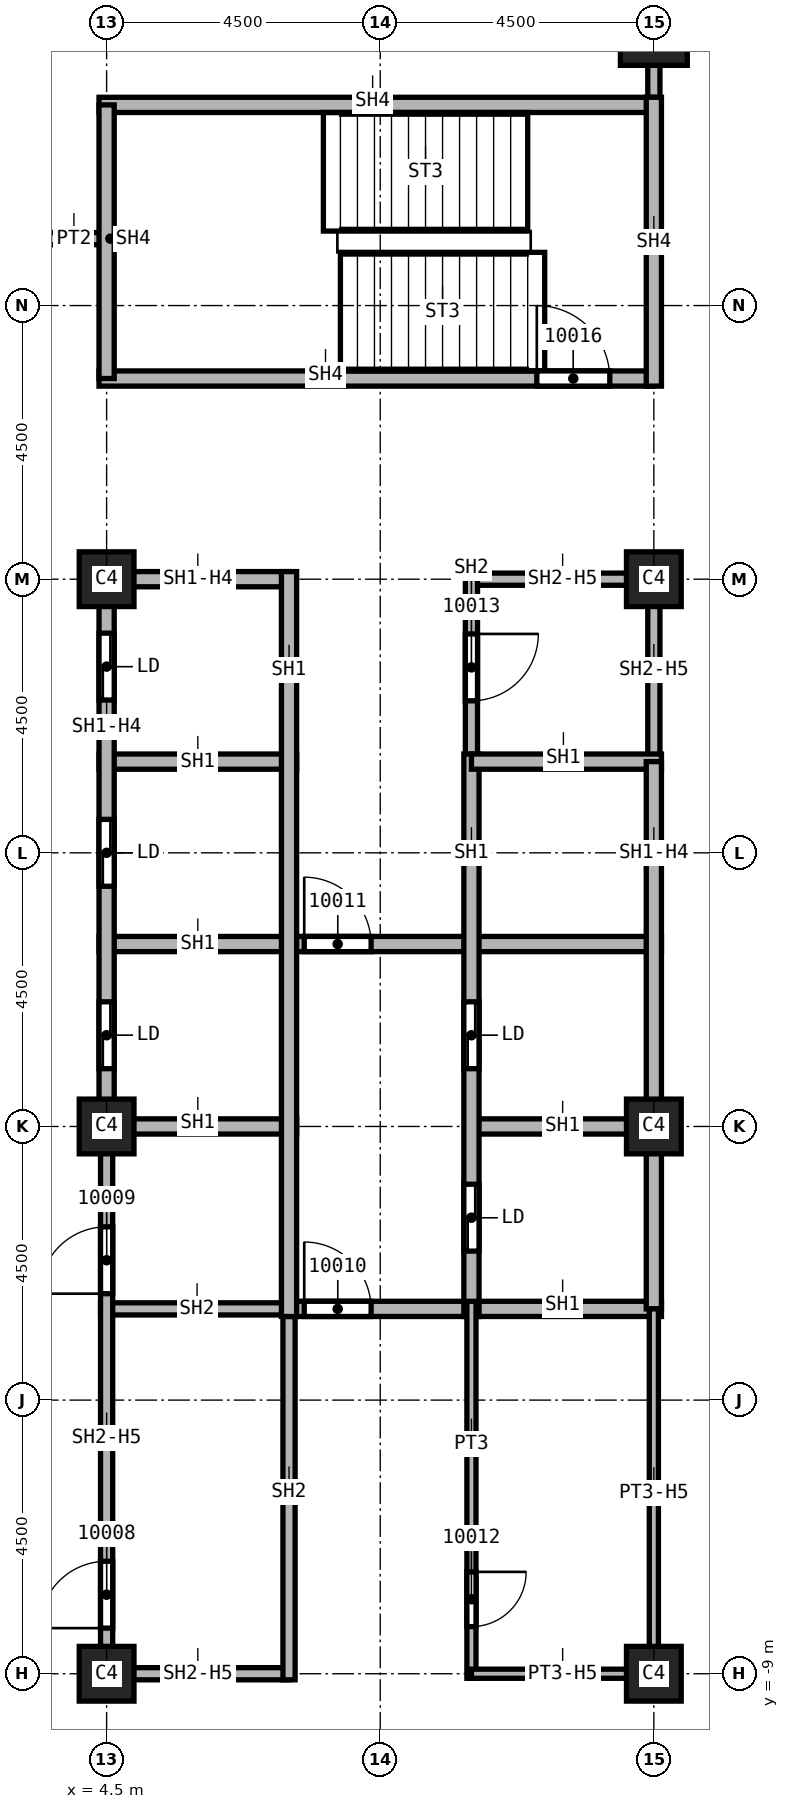
"""IFC4 building model, lengths in metres.
Left out: names, types, materials, properties, quantities, classifications, styles, units other than length and angle.
Written with IfcOpenShell. Run it as: python <this file> out.ifc"""

import sys

from ifc_helpers import new_model, si_unit, direction, frame, frame_2d, origin, origin_2d, place, context, subcontext, project, spatial, rectangle, extrude, element, fill, save


model = new_model("IFC4")
c1 = context("Model", 3, precision=1e-05, world=origin(), true_north=direction((0.0, 1.0)))
c2 = subcontext(c1, "Body", "Model", "MODEL_VIEW")
j1 = project(units=[si_unit("LENGTHUNIT", "METRE"), si_unit("PLANEANGLEUNIT", "RADIAN")], contexts=[c1])
p1 = place(None, origin())
s1 = spatial("IfcSite", under=j1, at=p1, CompositionType="ELEMENT")
p2 = place(p1, origin())
s2 = spatial("IfcBuilding", under=s1, at=p2, CompositionType="ELEMENT")
p3 = place(p2, frame((0.0, 0.0, 174.0)))
s3 = spatial("IfcBuildingStorey", under=s2, at=p3, CompositionType="ELEMENT", Elevation=174.0)
p4 = place(p3, frame((13.5, 18.0, 0.0), z_axis=(0.0, 0.0, 1.0), x_axis=(1.0, 0.0, 0.0)))
e1 = element("IfcColumn", 1, at=p4, inside=s3, PredefinedType="COLUMN", context=c2, shape_type="SweptSolid", body=[
    extrude(rectangle(XDim=1.1, YDim=1.1, at=origin_2d()), origin(), (0.0, 0.0, 1.0), 3.59),
])
for number, where, z_axis, x_axis in (
    (2, (4.5, 0.0, 0.0), (0.0, 0.0, 1.0), (1.0, 0.0, 0.0)),
    (3, (4.5, 9.0, 0.0), (0.0, 0.0, 1.0), (1.0, 0.0, 0.0)),
    (4, (4.5, -9.0, 0.0), (0.0, 0.0, 1.0), (1.0, 0.0, 0.0)),
    (5, (13.5, 0.0, 0.0), (0.0, 0.0, 1.0), (1.0, 0.0, 0.0)),
    (6, (13.5, 9.0, 0.0), (0.0, 0.0, 1.0), (1.0, 0.0, 0.0)),
    (7, (13.5, -9.0, 0.0), (0.0, 0.0, 1.0), (1.0, 0.0, 0.0)),
):
    element("IfcColumn", number, at=place(p3, frame(where, z_axis=z_axis, x_axis=x_axis)), inside=s3, PredefinedType="COLUMN", context=c2, shape_type="SweptSolid", body=[
        extrude(rectangle(XDim=0.9, YDim=0.9, at=origin_2d()), origin(), (0.0, 0.0, 1.0), 3.59),
    ])
p5 = place(p3, frame((3.55, 14.6, 0.0), z_axis=(0.0, 0.0, 1.0), x_axis=(1.0, 0.0, 0.0)))
e8 = element("IfcWall", 8, at=p5, inside=s3, PredefinedType="PARTITIONING", context=c2, shape_type="SweptSolid", body=[
    extrude(rectangle(XDim=0.95, YDim=0.2, at=frame_2d((0.475, 0.0))), origin(), (0.0, 0.0, 1.0), 3.59),
])
p6 = place(p3, frame((13.5, 16.675, 0.0), z_axis=(0.0, 0.0, 1.0), x_axis=(0.0, 1.0, 0.0)))
e9 = element("IfcWall", 9, at=p6, inside=s3, PredefinedType="PARTITIONING", context=c2, shape_type="SweptSolid", body=[
    extrude(rectangle(XDim=6.375, YDim=0.2, at=frame_2d((3.188, 0.0))), origin(), (0.0, 0.0, 1.0), 3.59),
])
p7 = place(p6, frame((3.55, 0.0, 0.0)))
e10 = element("IfcOpeningElement", 10, at=p7, cuts=e9, PredefinedType="OPENING", context=c2, shape_type="SweptSolid", body=[
    extrude(rectangle(XDim=1.0, YDim=2.1, at=frame_2d((0.5, 1.05))), frame((0.0, 0.1, 0.0), z_axis=(0.0, -1.0, 0.0), x_axis=(1.0, 0.0, 0.0)), (0.0, 0.0, 1.0), 0.2),
])
p8 = place(p3, frame((4.4, -3.0, 0.0), z_axis=(0.0, 0.0, 1.0), x_axis=(1.0, 0.0, 0.0)))
e11 = element("IfcWall", 11, at=p8, inside=s3, PredefinedType="SOLIDWALL", context=c2, shape_type="SweptSolid", body=[
    extrude(rectangle(XDim=3.225, YDim=0.2, at=frame_2d((1.613, 0.0))), origin(), (0.0, 0.0, 1.0), 3.59),
])
p9 = place(p3, frame((4.5, -9.1, 0.0), z_axis=(0.0, 0.0, 1.0), x_axis=(0.0, 1.0, 0.0)))
e12 = element("IfcWall", 12, at=p9, inside=s3, PredefinedType="SOLIDWALL", context=c2, shape_type="SweptSolid", body=[
    extrude(rectangle(XDim=9.1, YDim=0.2, at=frame_2d((4.55, 0.0))), origin(), (0.0, 0.0, 1.0), 2.828),
])
p10 = place(p9, frame((0.85, 0.0, 0.0)))
e13 = element("IfcOpeningElement", 13, at=p10, cuts=e12, PredefinedType="OPENING", context=c2, shape_type="SweptSolid", body=[
    extrude(rectangle(XDim=1.1, YDim=2.1, at=frame_2d((0.55, 1.05))), frame((0.0, 0.1, 0.0), z_axis=(0.0, -1.0, 0.0), x_axis=(1.0, 0.0, 0.0)), (0.0, 0.0, 1.0), 0.2),
])
p11 = place(p9, frame((6.35, 0.0, 0.0)))
e14 = element("IfcOpeningElement", 14, at=p11, cuts=e12, PredefinedType="OPENING", context=c2, shape_type="SweptSolid", body=[
    extrude(rectangle(XDim=1.1, YDim=2.1, at=frame_2d((0.55, 1.05))), frame((0.0, 0.1, 0.0), z_axis=(0.0, -1.0, 0.0), x_axis=(1.0, 0.0, 0.0)), (0.0, 0.0, 1.0), 0.2),
])
p12 = place(p3, frame((7.5, -9.0, 0.0), z_axis=(0.0, 0.0, 1.0), x_axis=(-1.0, 0.0, 0.0)))
e15 = element("IfcWall", 15, at=p12, inside=s3, PredefinedType="SOLIDWALL", context=c2, shape_type="SweptSolid", body=[
    extrude(rectangle(XDim=3.0, YDim=0.2, at=frame_2d((1.5, 0.0))), origin(), (0.0, 0.0, 1.0), 2.828),
])
p13 = place(p3, frame((7.5, -2.875, 0.0), z_axis=(0.0, 0.0, 1.0), x_axis=(0.0, -1.0, 0.0)))
e16 = element("IfcWall", 16, at=p13, inside=s3, PredefinedType="SOLIDWALL", context=c2, shape_type="SweptSolid", body=[
    extrude(rectangle(XDim=6.225, YDim=0.2, at=frame_2d((3.113, 0.0))), origin(), (0.0, 0.0, 1.0), 3.59),
])
p14 = place(p3, frame((10.5, 9.0, 0.0), z_axis=(0.0, 0.0, 1.0), x_axis=(1.0, 0.0, 0.0)))
e17 = element("IfcWall", 17, at=p14, inside=s3, PredefinedType="SOLIDWALL", context=c2, shape_type="SweptSolid", body=[
    extrude(rectangle(XDim=3.0, YDim=0.2, at=frame_2d((1.5, 0.0))), origin(), (0.0, 0.0, 1.0), 2.828),
])
p15 = place(p3, frame((10.5, 9.1, 0.0), z_axis=(0.0, 0.0, 1.0), x_axis=(0.0, -1.0, 0.0)))
e18 = element("IfcWall", 18, at=p15, inside=s3, PredefinedType="SOLIDWALL", context=c2, shape_type="SweptSolid", body=[
    extrude(rectangle(XDim=3.225, YDim=0.2, at=frame_2d((1.613, 0.0))), origin(), (0.0, 0.0, 1.0), 3.59),
])
p16 = place(p15, frame((1.0, 0.0, 0.0)))
e19 = element("IfcOpeningElement", 19, at=p16, cuts=e18, PredefinedType="OPENING", context=c2, shape_type="SweptSolid", body=[
    extrude(rectangle(XDim=1.1, YDim=2.1, at=frame_2d((0.55, 1.05))), frame((0.0, 0.1, 0.0), z_axis=(0.0, -1.0, 0.0), x_axis=(1.0, 0.0, 0.0)), (0.0, 0.0, 1.0), 0.2),
])
p17 = place(p3, frame((13.5, 9.1, 0.0), z_axis=(0.0, 0.0, 1.0), x_axis=(0.0, -1.0, 0.0)))
e20 = element("IfcWall", 20, at=p17, inside=s3, PredefinedType="SOLIDWALL", context=c2, shape_type="SweptSolid", body=[
    extrude(rectangle(XDim=3.1, YDim=0.2, at=frame_2d((1.55, 0.0))), origin(), (0.0, 0.0, 1.0), 2.828),
])
p18 = place(p3, frame((4.375, 0.0, 0.0), z_axis=(0.0, 0.0, 1.0), x_axis=(1.0, 0.0, 0.0)))
e21 = element("IfcWall", 21, at=p18, inside=s3, PredefinedType="SOLIDWALL", context=c2, shape_type="SweptSolid", body=[
    extrude(rectangle(XDim=3.25, YDim=0.25, at=frame_2d((1.625, 0.0))), origin(), (0.0, 0.0, 1.0), 3.59),
])
p19 = place(p3, frame((4.375, 3.0, 0.0), z_axis=(0.0, 0.0, 1.0), x_axis=(1.0, 0.0, 0.0)))
e22 = element("IfcWall", 22, at=p19, inside=s3, PredefinedType="SOLIDWALL", context=c2, shape_type="SweptSolid", body=[
    extrude(rectangle(XDim=9.25, YDim=0.25, at=frame_2d((4.625, 0.0))), origin(), (0.0, 0.0, 1.0), 3.59),
])
p20 = place(p19, frame((3.375, 0.0, 0.0)))
e23 = element("IfcOpeningElement", 23, at=p20, cuts=e22, PredefinedType="OPENING", context=c2, shape_type="SweptSolid", body=[
    extrude(rectangle(XDim=1.1, YDim=2.1, at=frame_2d((0.55, 1.05))), frame((0.0, 0.125, 0.0), z_axis=(0.0, -1.0, 0.0), x_axis=(1.0, 0.0, 0.0)), (0.0, 0.0, 1.0), 0.25),
])
p21 = place(p3, frame((4.375, 6.0, 0.0), z_axis=(0.0, 0.0, 1.0), x_axis=(1.0, 0.0, 0.0)))
e24 = element("IfcWall", 24, at=p21, inside=s3, PredefinedType="SOLIDWALL", context=c2, shape_type="SweptSolid", body=[
    extrude(rectangle(XDim=3.25, YDim=0.25, at=frame_2d((1.625, 0.0))), origin(), (0.0, 0.0, 1.0), 3.59),
])
p22 = place(p3, frame((4.5, 0.0, 0.0), z_axis=(0.0, 0.0, 1.0), x_axis=(0.0, 1.0, 0.0)))
e25 = element("IfcWall", 25, at=p22, inside=s3, PredefinedType="SOLIDWALL", context=c2, shape_type="SweptSolid", body=[
    extrude(rectangle(XDim=9.125, YDim=0.25, at=frame_2d((4.562, 0.0))), origin(), (0.0, 0.0, 1.0), 2.828),
])
p23 = place(p22, frame((0.95, 0.0, 0.0)))
e26 = element("IfcOpeningElement", 26, at=p23, cuts=e25, PredefinedType="OPENING", context=c2, shape_type="SweptSolid", body=[
    extrude(rectangle(XDim=1.1, YDim=2.1, at=frame_2d((0.55, 1.05))), frame((0.0, 0.125, 0.0), z_axis=(0.0, -1.0, 0.0), x_axis=(1.0, 0.0, 0.0)), (0.0, 0.0, 1.0), 0.25),
])
p24 = place(p22, frame((3.95, 0.0, 0.0)))
e27 = element("IfcOpeningElement", 27, at=p24, cuts=e25, PredefinedType="OPENING", context=c2, shape_type="SweptSolid", body=[
    extrude(rectangle(XDim=1.1, YDim=2.1, at=frame_2d((0.55, 1.05))), frame((0.0, 0.125, 0.0), z_axis=(0.0, -1.0, 0.0), x_axis=(1.0, 0.0, 0.0)), (0.0, 0.0, 1.0), 0.25),
])
p25 = place(p22, frame((7.012, 0.0, 0.0)))
e28 = element("IfcOpeningElement", 28, at=p25, cuts=e25, PredefinedType="OPENING", context=c2, shape_type="SweptSolid", body=[
    extrude(rectangle(XDim=1.1, YDim=2.1, at=frame_2d((0.55, 1.05))), frame((0.0, 0.125, 0.0), z_axis=(0.0, -1.0, 0.0), x_axis=(1.0, 0.0, 0.0)), (0.0, 0.0, 1.0), 0.25),
])
p26 = place(p3, frame((4.5, 9.0, 0.0), z_axis=(0.0, 0.0, 1.0), x_axis=(1.0, 0.0, 0.0)))
e29 = element("IfcWall", 29, at=p26, inside=s3, PredefinedType="SOLIDWALL", context=c2, shape_type="SweptSolid", body=[
    extrude(rectangle(XDim=3.0, YDim=0.25, at=frame_2d((1.5, 0.0))), origin(), (0.0, 0.0, 1.0), 2.828),
])
p27 = place(p3, frame((7.5, -3.0, 0.0), z_axis=(0.0, 0.0, 1.0), x_axis=(1.0, 0.0, 0.0)))
e30 = element("IfcWall", 30, at=p27, inside=s3, PredefinedType="SOLIDWALL", context=c2, shape_type="SweptSolid", body=[
    extrude(rectangle(XDim=6.125, YDim=0.25, at=frame_2d((3.062, 0.0))), origin(), (0.0, 0.0, 1.0), 3.59),
])
p28 = place(p27, frame((0.25, 0.0, 0.0)))
e31 = element("IfcOpeningElement", 31, at=p28, cuts=e30, PredefinedType="OPENING", context=c2, shape_type="SweptSolid", body=[
    extrude(rectangle(XDim=1.1, YDim=2.1, at=frame_2d((0.55, 1.05))), frame((0.0, 0.125, 0.0), z_axis=(0.0, -1.0, 0.0), x_axis=(1.0, 0.0, 0.0)), (0.0, 0.0, 1.0), 0.25),
])
p29 = place(p3, frame((7.5, 9.125, 0.0), z_axis=(0.0, 0.0, 1.0), x_axis=(0.0, -1.0, 0.0)))
e32 = element("IfcWall", 32, at=p29, inside=s3, PredefinedType="SOLIDWALL", context=c2, shape_type="SweptSolid", body=[
    extrude(rectangle(XDim=12.25, YDim=0.25, at=frame_2d((6.125, 0.0))), origin(), (0.0, 0.0, 1.0), 3.59),
])
p30 = place(p3, frame((10.5, 0.0, 0.0), z_axis=(0.0, 0.0, 1.0), x_axis=(1.0, 0.0, 0.0)))
e33 = element("IfcWall", 33, at=p30, inside=s3, PredefinedType="SOLIDWALL", context=c2, shape_type="SweptSolid", body=[
    extrude(rectangle(XDim=3.125, YDim=0.25, at=frame_2d((1.562, 0.0))), origin(), (0.0, 0.0, 1.0), 3.59),
])
p31 = place(p3, frame((10.5, 6.125, 0.0), z_axis=(0.0, 0.0, 1.0), x_axis=(0.0, -1.0, 0.0)))
e34 = element("IfcWall", 34, at=p31, inside=s3, PredefinedType="SOLIDWALL", context=c2, shape_type="SweptSolid", body=[
    extrude(rectangle(XDim=9.25, YDim=0.25, at=frame_2d((4.625, 0.0))), origin(), (0.0, 0.0, 1.0), 3.59),
])
p32 = place(p31, frame((7.075, 0.0, 0.0)))
e35 = element("IfcOpeningElement", 35, at=p32, cuts=e34, PredefinedType="OPENING", context=c2, shape_type="SweptSolid", body=[
    extrude(rectangle(XDim=1.1, YDim=2.1, at=frame_2d((0.55, 1.05))), frame((0.0, 0.125, 0.0), z_axis=(0.0, -1.0, 0.0), x_axis=(1.0, 0.0, 0.0)), (0.0, 0.0, 1.0), 0.25),
])
p33 = place(p31, frame((4.075, 0.0, 0.0)))
e36 = element("IfcOpeningElement", 36, at=p33, cuts=e34, PredefinedType="OPENING", context=c2, shape_type="SweptSolid", body=[
    extrude(rectangle(XDim=1.1, YDim=2.1, at=frame_2d((0.55, 1.05))), frame((0.0, 0.125, 0.0), z_axis=(0.0, -1.0, 0.0), x_axis=(1.0, 0.0, 0.0)), (0.0, 0.0, 1.0), 0.25),
])
p34 = place(p3, frame((10.5, 6.0, 0.0), z_axis=(0.0, 0.0, 1.0), x_axis=(1.0, 0.0, 0.0)))
e37 = element("IfcWall", 37, at=p34, inside=s3, PredefinedType="SOLIDWALL", context=c2, shape_type="SweptSolid", body=[
    extrude(rectangle(XDim=3.125, YDim=0.25, at=frame_2d((1.562, 0.0))), origin(), (0.0, 0.0, 1.0), 3.59),
])
p35 = place(p3, frame((13.5, 6.0, 0.0), z_axis=(0.0, 0.0, 1.0), x_axis=(0.0, -1.0, 0.0)))
e38 = element("IfcWall", 38, at=p35, inside=s3, PredefinedType="SOLIDWALL", context=c2, shape_type="SweptSolid", body=[
    extrude(rectangle(XDim=9.0, YDim=0.25, at=frame_2d((4.5, 0.0))), origin(), (0.0, 0.0, 1.0), 2.828),
])
p36 = place(p3, frame((4.375, 12.3, 0.0), z_axis=(0.0, 0.0, 1.0), x_axis=(1.0, 0.0, 0.0)))
e39 = element("IfcWall", 39, at=p36, inside=s3, PredefinedType="SOLIDWALL", context=c2, shape_type="SweptSolid", body=[
    extrude(rectangle(XDim=9.125, YDim=0.25, at=frame_2d((4.562, 0.0))), origin(), (0.0, 0.0, 1.0), 3.59),
])
p37 = place(p36, frame((7.2, 0.0, 0.0)))
e40 = element("IfcOpeningElement", 40, at=p37, cuts=e39, PredefinedType="OPENING", context=c2, shape_type="SweptSolid", body=[
    extrude(rectangle(XDim=1.2, YDim=2.1, at=frame_2d((0.6, 1.05))), frame((0.0, 0.125, 0.0), z_axis=(0.0, -1.0, 0.0), x_axis=(1.0, 0.0, 0.0)), (0.0, 0.0, 1.0), 0.25),
])
p38 = place(p3, frame((4.375, 16.8, 0.0), z_axis=(0.0, 0.0, 1.0), x_axis=(1.0, 0.0, 0.0)))
e41 = element("IfcWall", 41, at=p38, inside=s3, PredefinedType="SOLIDWALL", context=c2, shape_type="SweptSolid", body=[
    extrude(rectangle(XDim=9.125, YDim=0.25, at=frame_2d((4.562, 0.0))), origin(), (0.0, 0.0, 1.0), 3.59),
])
p39 = place(p3, frame((4.5, 12.3, 0.0), z_axis=(0.0, 0.0, 1.0), x_axis=(0.0, 1.0, 0.0)))
e42 = element("IfcWall", 42, at=p39, inside=s3, PredefinedType="SOLIDWALL", context=c2, shape_type="SweptSolid", body=[
    extrude(rectangle(XDim=4.5, YDim=0.25, at=frame_2d((2.25, 0.0))), origin(), (0.0, 0.0, 1.0), 3.59),
])
p40 = place(p3, frame((13.5, 12.175, 0.0), z_axis=(0.0, 0.0, 1.0), x_axis=(0.0, 1.0, 0.0)))
e43 = element("IfcWall", 43, at=p40, inside=s3, PredefinedType="SOLIDWALL", context=c2, shape_type="SweptSolid", body=[
    extrude(rectangle(XDim=4.75, YDim=0.25, at=frame_2d((2.375, 0.0))), origin(), (0.0, 0.0, 1.0), 3.59),
])
p41 = place(p3, frame((10.5, -2.875, 0.0), z_axis=(0.0, 0.0, 1.0), x_axis=(0.0, -1.0, 0.0)))
e44 = element("IfcWall", 44, at=p41, inside=s3, PredefinedType="PARTITIONING", context=c2, shape_type="SweptSolid", body=[
    extrude(rectangle(XDim=6.2, YDim=0.15, at=frame_2d((3.1, 0.0))), origin(), (0.0, 0.0, 1.0), 3.59),
])
p42 = place(p41, frame((4.45, 0.0, 0.0)))
e45 = element("IfcOpeningElement", 45, at=p42, cuts=e44, PredefinedType="OPENING", context=c2, shape_type="SweptSolid", body=[
    extrude(rectangle(XDim=0.9, YDim=2.1, at=frame_2d((0.45, 1.05))), frame((0.0, 0.075, 0.0), z_axis=(0.0, -1.0, 0.0), x_axis=(1.0, 0.0, 0.0)), (0.0, 0.0, 1.0), 0.15),
])
p43 = place(p3, frame((13.5, -9.0, 0.0), z_axis=(0.0, 0.0, 1.0), x_axis=(-1.0, 0.0, 0.0)))
e46 = element("IfcWall", 46, at=p43, inside=s3, PredefinedType="PARTITIONING", context=c2, shape_type="SweptSolid", body=[
    extrude(rectangle(XDim=3.0, YDim=0.15, at=frame_2d((1.5, 0.0))), origin(), (0.0, 0.0, 1.0), 2.828),
])
p44 = place(p3, frame((13.5, -3.0, 0.0), z_axis=(0.0, 0.0, 1.0), x_axis=(0.0, -1.0, 0.0)))
e47 = element("IfcWall", 47, at=p44, inside=s3, PredefinedType="PARTITIONING", context=c2, shape_type="SweptSolid", body=[
    extrude(rectangle(XDim=6.075, YDim=0.15, at=frame_2d((3.038, 0.0))), origin(), (0.0, 0.0, 1.0), 2.828),
])
p45 = place(p10, origin())
e48 = element("IfcDoor", 48, at=p45, inside=s3, OperationType="SINGLE_SWING_LEFT", PredefinedType="DOOR", context=c2, shape_type="SweptSolid", body=[
    extrude(rectangle(XDim=1.1, YDim=2.1, at=frame_2d((0.55, 1.05))), frame((0.0, 0.025, 0.0), z_axis=(0.0, -1.0, 0.0), x_axis=(1.0, 0.0, 0.0)), (0.0, 0.0, 1.0), 0.05),
])
fill(e13, e48)
p46 = place(p11, origin())
e49 = element("IfcDoor", 49, at=p46, inside=s3, OperationType="SINGLE_SWING_RIGHT", PredefinedType="DOOR", context=c2, shape_type="SweptSolid", body=[
    extrude(rectangle(XDim=1.1, YDim=2.1, at=frame_2d((0.55, 1.05))), frame((0.0, 0.025, 0.0), z_axis=(0.0, -1.0, 0.0), x_axis=(1.0, 0.0, 0.0)), (0.0, 0.0, 1.0), 0.05),
])
fill(e14, e49)
p47 = place(p28, origin())
e50 = element("IfcDoor", 50, at=p47, inside=s3, OperationType="SINGLE_SWING_LEFT", PredefinedType="DOOR", context=c2, shape_type="SweptSolid", body=[
    extrude(rectangle(XDim=1.1, YDim=2.1, at=frame_2d((0.55, 1.05))), frame((0.0, 0.025, 0.0), z_axis=(0.0, -1.0, 0.0), x_axis=(1.0, 0.0, 0.0)), (0.0, 0.0, 1.0), 0.05),
])
fill(e31, e50)
p48 = place(p20, origin())
e51 = element("IfcDoor", 51, at=p48, inside=s3, OperationType="SINGLE_SWING_RIGHT", PredefinedType="DOOR", context=c2, shape_type="SweptSolid", body=[
    extrude(rectangle(XDim=1.1, YDim=2.1, at=frame_2d((0.55, 1.05))), frame((0.0, 0.025, 0.0), z_axis=(0.0, -1.0, 0.0), x_axis=(1.0, 0.0, 0.0)), (0.0, 0.0, 1.0), 0.05),
])
fill(e23, e51)
p49 = place(p42, origin())
e52 = element("IfcDoor", 52, at=p49, inside=s3, OperationType="SINGLE_SWING_LEFT", PredefinedType="DOOR", context=c2, shape_type="SweptSolid", body=[
    extrude(rectangle(XDim=0.9, YDim=2.1, at=frame_2d((0.45, 1.05))), frame((0.0, 0.025, 0.0), z_axis=(0.0, -1.0, 0.0), x_axis=(1.0, 0.0, 0.0)), (0.0, 0.0, 1.0), 0.05),
])
fill(e45, e52)
p50 = place(p16, origin())
e53 = element("IfcDoor", 53, at=p50, inside=s3, OperationType="SINGLE_SWING_RIGHT", PredefinedType="DOOR", context=c2, shape_type="SweptSolid", body=[
    extrude(rectangle(XDim=1.1, YDim=2.1, at=frame_2d((0.55, 1.05))), frame((0.0, 0.025, 0.0), z_axis=(0.0, -1.0, 0.0), x_axis=(1.0, 0.0, 0.0)), (0.0, 0.0, 1.0), 0.05),
])
fill(e19, e53)
p51 = place(p37, origin())
e54 = element("IfcDoor", 54, at=p51, inside=s3, OperationType="SINGLE_SWING_LEFT", PredefinedType="DOOR", context=c2, shape_type="SweptSolid", body=[
    extrude(rectangle(XDim=1.2, YDim=2.1, at=frame_2d((0.6, 1.05))), frame((0.0, 0.025, 0.0), z_axis=(0.0, -1.0, 0.0), x_axis=(1.0, 0.0, 0.0)), (0.0, 0.0, 1.0), 0.05),
])
fill(e40, e54)
p52 = place(p23, origin())
e55 = element("IfcDoor", 55, at=p52, inside=s3, OperationType="SLIDING_TO_LEFT", PredefinedType="DOOR", context=c2, shape_type="SweptSolid", body=[
    extrude(rectangle(XDim=1.1, YDim=2.1, at=frame_2d((0.55, 1.05))), frame((0.0, 0.025, 0.0), z_axis=(0.0, -1.0, 0.0), x_axis=(1.0, 0.0, 0.0)), (0.0, 0.0, 1.0), 0.05),
])
fill(e26, e55)
p53 = place(p24, origin())
e56 = element("IfcDoor", 56, at=p53, inside=s3, OperationType="SLIDING_TO_LEFT", PredefinedType="DOOR", context=c2, shape_type="SweptSolid", body=[
    extrude(rectangle(XDim=1.1, YDim=2.1, at=frame_2d((0.55, 1.05))), frame((0.0, 0.025, 0.0), z_axis=(0.0, -1.0, 0.0), x_axis=(1.0, 0.0, 0.0)), (0.0, 0.0, 1.0), 0.05),
])
fill(e27, e56)
p54 = place(p25, origin())
e57 = element("IfcDoor", 57, at=p54, inside=s3, OperationType="SLIDING_TO_LEFT", PredefinedType="DOOR", context=c2, shape_type="SweptSolid", body=[
    extrude(rectangle(XDim=1.1, YDim=2.1, at=frame_2d((0.55, 1.05))), frame((0.0, 0.025, 0.0), z_axis=(0.0, -1.0, 0.0), x_axis=(1.0, 0.0, 0.0)), (0.0, 0.0, 1.0), 0.05),
])
fill(e28, e57)
p55 = place(p32, origin())
e58 = element("IfcDoor", 58, at=p55, inside=s3, OperationType="SLIDING_TO_LEFT", PredefinedType="DOOR", context=c2, shape_type="SweptSolid", body=[
    extrude(rectangle(XDim=1.1, YDim=2.1, at=frame_2d((0.55, 1.05))), frame((0.0, 0.025, 0.0), z_axis=(0.0, -1.0, 0.0), x_axis=(1.0, 0.0, 0.0)), (0.0, 0.0, 1.0), 0.05),
])
fill(e35, e58)
p56 = place(p33, origin())
e59 = element("IfcDoor", 59, at=p56, inside=s3, OperationType="SLIDING_TO_LEFT", PredefinedType="DOOR", context=c2, shape_type="SweptSolid", body=[
    extrude(rectangle(XDim=1.1, YDim=2.1, at=frame_2d((0.55, 1.05))), frame((0.0, 0.025, 0.0), z_axis=(0.0, -1.0, 0.0), x_axis=(1.0, 0.0, 0.0)), (0.0, 0.0, 1.0), 0.05),
])
fill(e36, e59)
save(model, sys.argv[1])
